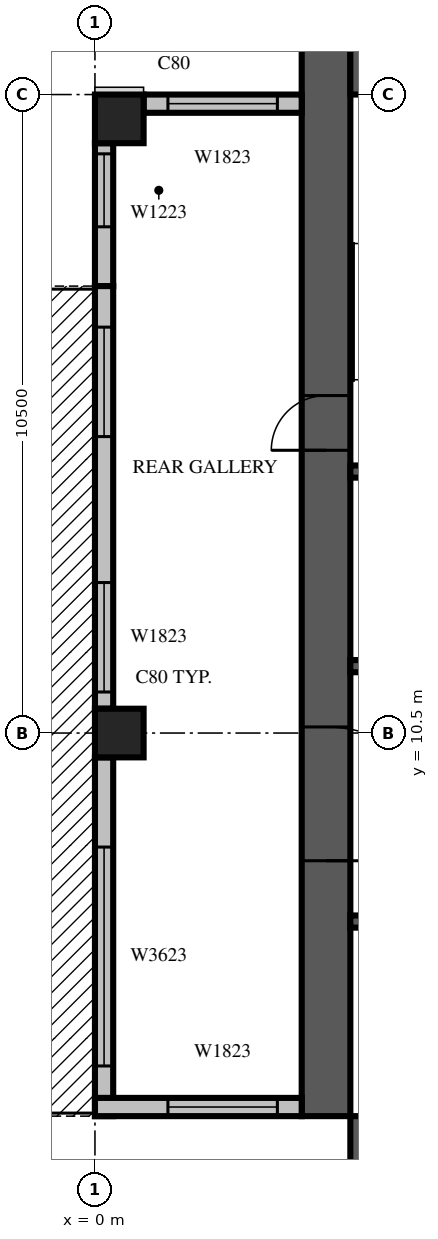
"""IFC4 building model, lengths in metres.
Left out: names, types, materials, properties, quantities, classifications, styles, units other than length and angle.
Written with IfcOpenShell. Run it as: python <this file> out.ifc"""

import sys

from ifc_helpers import new_model, si_unit, direction, frame, frame_2d, origin, origin_2d, place, context, subcontext, project, spatial, rectangle, extrude, source, transform, mapped, element, fill, save


model = new_model("IFC4")
c1 = context("Model", 3, precision=1e-05, world=origin(), true_north=direction((0.0, 1.0)))
c2 = subcontext(c1, "Body", "Model", "MODEL_VIEW")
j1 = project(units=[si_unit("LENGTHUNIT", "METRE"), si_unit("PLANEANGLEUNIT", "RADIAN")], contexts=[c1])
p1 = place(None, origin())
s1 = spatial("IfcSite", under=j1, at=p1, CompositionType="ELEMENT")
p2 = place(p1, origin())
s2 = spatial("IfcBuilding", under=s1, at=p2, CompositionType="ELEMENT")
p3 = place(p2, frame((0.0, 0.0, 238.6)))
s3 = spatial("IfcBuildingStorey", under=s2, at=p3, CompositionType="ELEMENT", Elevation=238.6)
m1 = source(origin(), c2, "Body", "SweptSolid", [
    extrude(rectangle(XDim=0.8, YDim=0.8, at=origin_2d()), origin(), (0.0, 0.0, 1.0), 3.8),
])
for number, where, z_axis, x_axis in (
    (1, (0.4, 10.5, 0.0), (0.0, 0.0, 1.0), (1.0, 0.0, 0.0)),
    (2, (0.4, 20.6, 0.0), (0.0, 0.0, 1.0), (1.0, 0.0, 0.0)),
):
    element("IfcColumn", number, at=place(p3, frame(where, z_axis=z_axis, x_axis=x_axis)), inside=s3, PredefinedType="COLUMN", context=c2, shape_type="MappedRepresentation", body=[
        mapped(m1, transform((0.0, 0.0, 0.0), scale=1.0)),
    ])
m2 = source(origin(), c2, "Body", "SweptSolid", [
    extrude(rectangle(XDim=17.6, YDim=0.8, at=frame_2d((8.8, 0.0))), origin(), (0.0, 0.0, 1.0), 3.8),
])
p4 = place(p3, frame((3.8, 4.2, 0.0), z_axis=(0.0, 0.0, 1.0), x_axis=(0.0, 1.0, 0.0)))
e3 = element("IfcWall", 3, at=p4, inside=s3, PredefinedType="SHEAR", context=c2, shape_type="MappedRepresentation", body=[
    mapped(m2, transform((0.0, 0.0, 0.0), scale=1.0)),
])
m3 = source(origin(), c2, "Body", "SweptSolid", [
    extrude(rectangle(XDim=2.2, YDim=2.1, at=frame_2d((1.1, 1.05))), frame((0.0, 0.41, 0.0), z_axis=(0.0, -1.0, 0.0), x_axis=(1.0, 0.0, 0.0)), (0.0, 0.0, 1.0), 0.82),
])
p5 = place(p4, frame((4.2, 0.0, 0.0)))
e4 = element("IfcOpeningElement", 4, at=p5, cuts=e3, PredefinedType="OPENING", context=c2, shape_type="MappedRepresentation", body=[
    mapped(m3, transform((0.0, 0.0, 0.0), scale=1.0)),
])
m4 = source(origin(), c2, "Body", "SweptSolid", [
    extrude(rectangle(XDim=0.9, YDim=2.1, at=frame_2d((0.45, 1.05))), frame((0.0, 0.41, 0.0), z_axis=(0.0, -1.0, 0.0), x_axis=(1.0, 0.0, 0.0)), (0.0, 0.0, 1.0), 0.82),
])
p6 = place(p4, frame((10.95, 0.0, 0.0)))
e5 = element("IfcOpeningElement", 5, at=p6, cuts=e3, PredefinedType="OPENING", context=c2, shape_type="MappedRepresentation", body=[
    mapped(m4, transform((0.0, 0.0, 0.0), scale=1.0)),
])
p7 = place(p3, frame((4.2, 3.8, 0.0), z_axis=(0.0, 0.0, 1.0), x_axis=(1.0, 0.0, 0.0)))
e6 = element("IfcWall", 6, at=p7, inside=s3, PredefinedType="SHEAR", context=c2, shape_type="MappedRepresentation", body=[
    mapped(m2, transform((0.0, 0.0, 0.0), scale=1.0)),
])
p8 = place(p7, frame((12.75, 0.0, 0.0)))
e7 = element("IfcOpeningElement", 7, at=p8, cuts=e6, PredefinedType="OPENING", context=c2, shape_type="MappedRepresentation", body=[
    mapped(m4, transform((0.0, 0.0, 0.0), scale=1.0)),
])
m5 = source(origin(), c2, "Body", "SweptSolid", [
    extrude(rectangle(XDim=16.8, YDim=0.8, at=frame_2d((8.4, 0.0))), origin(), (0.0, 0.0, 1.0), 3.8),
])
p9 = place(p3, frame((4.2, 21.4, 0.0), z_axis=(0.0, 0.0, 1.0), x_axis=(1.0, 0.0, 0.0)))
e8 = element("IfcWall", 8, at=p9, inside=s3, PredefinedType="SHEAR", context=c2, shape_type="MappedRepresentation", body=[
    mapped(m5, transform((0.0, 0.0, 0.0), scale=1.0)),
])
m6 = source(origin(), c2, "Body", "SweptSolid", [
    extrude(rectangle(XDim=1.2, YDim=2.1, at=frame_2d((0.6, 1.05))), frame((0.0, 0.41, 0.0), z_axis=(0.0, -1.0, 0.0), x_axis=(1.0, 0.0, 0.0)), (0.0, 0.0, 1.0), 0.82),
])
p10 = place(p9, frame((7.4, 0.0, 0.0)))
e9 = element("IfcOpeningElement", 9, at=p10, cuts=e8, PredefinedType="OPENING", context=c2, shape_type="MappedRepresentation", body=[
    mapped(m6, transform((0.0, 0.0, 0.0), scale=1.0)),
])
m7 = source(origin(), c2, "Body", "SweptSolid", [
    extrude(rectangle(XDim=2.6, YDim=0.3, at=frame_2d((1.3, 0.0))), origin(), (0.0, 0.0, 1.0), 3.4),
])
p11 = place(p3, frame((3.4, 20.85, 0.0), z_axis=(0.0, 0.0, 1.0), x_axis=(-1.0, 0.0, 0.0)))
e10 = element("IfcWall", 10, at=p11, inside=s3, PredefinedType="STANDARD", context=c2, shape_type="MappedRepresentation", body=[
    mapped(m7, transform((0.0, 0.0, 0.0), scale=1.0)),
])
m8 = source(origin(), c2, "Body", "SweptSolid", [
    extrude(rectangle(XDim=1.8, YDim=2.3, at=frame_2d((0.9, 1.15))), frame((0.0, 0.16, 0.0), z_axis=(0.0, -1.0, 0.0), x_axis=(1.0, 0.0, 0.0)), (0.0, 0.0, 1.0), 0.32),
])
p12 = place(p11, frame((0.4, 0.0, 0.6)))
e11 = element("IfcOpeningElement", 11, at=p12, cuts=e10, PredefinedType="OPENING", context=c2, shape_type="MappedRepresentation", body=[
    mapped(m8, transform((0.0, 0.0, 0.0), scale=1.0)),
])
m9 = source(origin(), c2, "Body", "SweptSolid", [
    extrude(rectangle(XDim=2.35, YDim=0.3, at=frame_2d((1.175, 0.0))), origin(), (0.0, 0.0, 1.0), 3.4),
])
p13 = place(p3, frame((0.15, 20.2, 0.0), z_axis=(0.0, 0.0, 1.0), x_axis=(0.0, -1.0, 0.0)))
e12 = element("IfcWall", 12, at=p13, inside=s3, PredefinedType="STANDARD", context=c2, shape_type="MappedRepresentation", body=[
    mapped(m9, transform((0.0, 0.0, 0.0), scale=1.0)),
])
m10 = source(origin(), c2, "Body", "SweptSolid", [
    extrude(rectangle(XDim=1.2, YDim=2.3, at=frame_2d((0.6, 1.15))), frame((0.0, 0.16, 0.0), z_axis=(0.0, -1.0, 0.0), x_axis=(1.0, 0.0, 0.0)), (0.0, 0.0, 1.0), 0.32),
])
p14 = place(p13, frame((0.175, 0.0, 0.6)))
e13 = element("IfcOpeningElement", 13, at=p14, cuts=e12, PredefinedType="OPENING", context=c2, shape_type="MappedRepresentation", body=[
    mapped(m10, transform((0.0, 0.0, 0.0), scale=1.0)),
])
m11 = source(origin(), c2, "Body", "SweptSolid", [
    extrude(rectangle(XDim=6.95, YDim=0.3, at=frame_2d((3.475, 0.0))), origin(), (0.0, 0.0, 1.0), 3.4),
])
p15 = place(p3, frame((0.15, 17.85, 0.0), z_axis=(0.0, 0.0, 1.0), x_axis=(0.0, -1.0, 0.0)))
e14 = element("IfcWall", 14, at=p15, inside=s3, PredefinedType="STANDARD", context=c2, shape_type="MappedRepresentation", body=[
    mapped(m11, transform((0.0, 0.0, 0.0), scale=1.0)),
])
m12 = source(origin(), c2, "Body", "SweptSolid", [
    extrude(rectangle(XDim=1.8, YDim=2.4, at=frame_2d((0.9, 1.2))), frame((0.0, 0.16, 0.0), z_axis=(0.0, -1.0, 0.0), x_axis=(1.0, 0.0, 0.0)), (0.0, 0.0, 1.0), 0.32),
])
p16 = place(p15, frame((0.675, 0.0, 0.0)))
e15 = element("IfcOpeningElement", 15, at=p16, cuts=e14, PredefinedType="OPENING", context=c2, shape_type="MappedRepresentation", body=[
    mapped(m12, transform((0.0, 0.0, 0.0), scale=1.0)),
])
p17 = place(p15, frame((4.875, 0.0, 0.6)))
e16 = element("IfcOpeningElement", 16, at=p17, cuts=e14, PredefinedType="OPENING", context=c2, shape_type="MappedRepresentation", body=[
    mapped(m8, transform((0.0, 0.0, 0.0), scale=1.0)),
])
m13 = source(origin(), c2, "Body", "SweptSolid", [
    extrude(rectangle(XDim=5.9, YDim=0.3, at=frame_2d((2.95, 0.0))), origin(), (0.0, 0.0, 1.0), 3.4),
])
p18 = place(p3, frame((0.15, 10.1, 0.0), z_axis=(0.0, 0.0, 1.0), x_axis=(0.0, -1.0, 0.0)))
e17 = element("IfcWall", 17, at=p18, inside=s3, PredefinedType="STANDARD", context=c2, shape_type="MappedRepresentation", body=[
    mapped(m13, transform((0.0, 0.0, 0.0), scale=1.0)),
])
m14 = source(origin(), c2, "Body", "SweptSolid", [
    extrude(rectangle(XDim=3.6, YDim=2.3, at=frame_2d((1.8, 1.15))), frame((0.0, 0.16, 0.0), z_axis=(0.0, -1.0, 0.0), x_axis=(1.0, 0.0, 0.0)), (0.0, 0.0, 1.0), 0.32),
])
p19 = place(p18, frame((1.475, 0.0, 0.6)))
e18 = element("IfcOpeningElement", 18, at=p19, cuts=e17, PredefinedType="OPENING", context=c2, shape_type="MappedRepresentation", body=[
    mapped(m14, transform((0.0, 0.0, 0.0), scale=1.0)),
])
m15 = source(origin(), c2, "Body", "SweptSolid", [
    extrude(rectangle(XDim=3.4, YDim=0.3, at=frame_2d((1.7, 0.0))), origin(), (0.0, 0.0, 1.0), 3.4),
])
p20 = place(p3, frame((0.0, 4.35, 0.0), z_axis=(0.0, 0.0, 1.0), x_axis=(1.0, 0.0, 0.0)))
e19 = element("IfcWall", 19, at=p20, inside=s3, PredefinedType="STANDARD", context=c2, shape_type="MappedRepresentation", body=[
    mapped(m15, transform((0.0, 0.0, 0.0), scale=1.0)),
])
p21 = place(p20, frame((1.2, 0.0, 0.6)))
e20 = element("IfcOpeningElement", 20, at=p21, cuts=e19, PredefinedType="OPENING", context=c2, shape_type="MappedRepresentation", body=[
    mapped(m8, transform((0.0, 0.0, 0.0), scale=1.0)),
])
m16 = source(origin(), c2, "Body", "SweptSolid", [
    extrude(rectangle(XDim=9.6, YDim=0.2, at=frame_2d((4.8, 0.0))), origin(), (0.0, 0.0, 1.0), 3.8),
])
p22 = place(p3, frame((4.2, 7.4, 0.0), z_axis=(0.0, 0.0, 1.0), x_axis=(1.0, 0.0, 0.0)))
e21 = element("IfcWall", 21, at=p22, inside=s3, PredefinedType="SOLIDWALL", context=c2, shape_type="MappedRepresentation", body=[
    mapped(m16, transform((0.0, 0.0, 0.0), scale=1.0)),
])
m17 = source(origin(), c2, "Body", "SweptSolid", [
    extrude(rectangle(XDim=1.1, YDim=2.1, at=frame_2d((0.55, 1.05))), frame((0.0, 0.11, 0.0), z_axis=(0.0, -1.0, 0.0), x_axis=(1.0, 0.0, 0.0)), (0.0, 0.0, 1.0), 0.22),
])
p23 = place(p22, frame((0.65, 0.0, 0.0)))
e22 = element("IfcOpeningElement", 22, at=p23, cuts=e21, PredefinedType="OPENING", context=c2, shape_type="MappedRepresentation", body=[
    mapped(m17, transform((0.0, 0.0, 0.0), scale=1.0)),
])
p24 = place(p22, frame((3.05, 0.0, 0.0)))
e23 = element("IfcOpeningElement", 23, at=p24, cuts=e21, PredefinedType="OPENING", context=c2, shape_type="MappedRepresentation", body=[
    mapped(m17, transform((0.0, 0.0, 0.0), scale=1.0)),
])
p25 = place(p22, frame((5.45, 0.0, 0.0)))
e24 = element("IfcOpeningElement", 24, at=p25, cuts=e21, PredefinedType="OPENING", context=c2, shape_type="MappedRepresentation", body=[
    mapped(m17, transform((0.0, 0.0, 0.0), scale=1.0)),
])
p26 = place(p22, frame((7.85, 0.0, 0.0)))
e25 = element("IfcOpeningElement", 25, at=p26, cuts=e21, PredefinedType="OPENING", context=c2, shape_type="MappedRepresentation", body=[
    mapped(m17, transform((0.0, 0.0, 0.0), scale=1.0)),
])
m18 = source(origin(), c2, "Body", "SweptSolid", [
    extrude(rectangle(XDim=4.8, YDim=0.2, at=frame_2d((2.4, 0.0))), origin(), (0.0, 0.0, 1.0), 3.8),
])
p27 = place(p3, frame((4.2, 11.6, 0.0), z_axis=(0.0, 0.0, 1.0), x_axis=(1.0, 0.0, 0.0)))
e26 = element("IfcWall", 26, at=p27, inside=s3, PredefinedType="SOLIDWALL", context=c2, shape_type="MappedRepresentation", body=[
    mapped(m18, transform((0.0, 0.0, 0.0), scale=1.0)),
])
p28 = place(p27, frame((0.65, 0.0, 0.0)))
e27 = element("IfcOpeningElement", 27, at=p28, cuts=e26, PredefinedType="OPENING", context=c2, shape_type="MappedRepresentation", body=[
    mapped(m17, transform((0.0, 0.0, 0.0), scale=1.0)),
])
p29 = place(p27, frame((3.05, 0.0, 0.0)))
e28 = element("IfcOpeningElement", 28, at=p29, cuts=e26, PredefinedType="OPENING", context=c2, shape_type="MappedRepresentation", body=[
    mapped(m17, transform((0.0, 0.0, 0.0), scale=1.0)),
])
p30 = place(p3, frame((4.2, 14.8, 0.0), z_axis=(0.0, 0.0, 1.0), x_axis=(1.0, 0.0, 0.0)))
e29 = element("IfcWall", 29, at=p30, inside=s3, PredefinedType="SOLIDWALL", context=c2, shape_type="MappedRepresentation", body=[
    mapped(m18, transform((0.0, 0.0, 0.0), scale=1.0)),
])
m19 = source(origin(), c2, "Body", "SweptSolid", [
    extrude(rectangle(XDim=1.8, YDim=2.3, at=frame_2d((0.9, 1.15))), frame((0.0, 0.03, 0.0), z_axis=(0.0, -1.0, 0.0), x_axis=(1.0, 0.0, 0.0)), (0.0, 0.0, 1.0), 0.06),
])
p31 = place(p12, origin())
e30 = element("IfcWindow", 30, at=p31, inside=s3, PartitioningType="SINGLE_PANEL", PredefinedType="WINDOW", context=c2, shape_type="MappedRepresentation", body=[
    mapped(m19, transform((0.0, 0.0, 0.0), scale=1.0)),
])
fill(e11, e30)
m20 = source(origin(), c2, "Body", "SweptSolid", [
    extrude(rectangle(XDim=1.2, YDim=2.3, at=frame_2d((0.6, 1.15))), frame((0.0, 0.03, 0.0), z_axis=(0.0, -1.0, 0.0), x_axis=(1.0, 0.0, 0.0)), (0.0, 0.0, 1.0), 0.06),
])
p32 = place(p14, origin())
e31 = element("IfcWindow", 31, at=p32, inside=s3, PartitioningType="SINGLE_PANEL", PredefinedType="WINDOW", context=c2, shape_type="MappedRepresentation", body=[
    mapped(m20, transform((0.0, 0.0, 0.0), scale=1.0)),
])
fill(e13, e31)
m21 = source(origin(), c2, "Body", "SweptSolid", [
    extrude(rectangle(XDim=1.8, YDim=2.4, at=frame_2d((0.9, 1.2))), frame((0.0, 0.025, 0.0), z_axis=(0.0, -1.0, 0.0), x_axis=(1.0, 0.0, 0.0)), (0.0, 0.0, 1.0), 0.05),
])
p33 = place(p16, origin())
e32 = element("IfcDoor", 32, at=p33, inside=s3, OperationType="SLIDING_TO_LEFT", PredefinedType="DOOR", context=c2, shape_type="MappedRepresentation", body=[
    mapped(m21, transform((0.0, 0.0, 0.0), scale=1.0)),
])
fill(e15, e32)
p34 = place(p17, origin())
e33 = element("IfcWindow", 33, at=p34, inside=s3, PartitioningType="SINGLE_PANEL", PredefinedType="WINDOW", context=c2, shape_type="MappedRepresentation", body=[
    mapped(m19, transform((0.0, 0.0, 0.0), scale=1.0)),
])
fill(e16, e33)
m22 = source(origin(), c2, "Body", "SweptSolid", [
    extrude(rectangle(XDim=3.6, YDim=2.3, at=frame_2d((1.8, 1.15))), frame((0.0, 0.03, 0.0), z_axis=(0.0, -1.0, 0.0), x_axis=(1.0, 0.0, 0.0)), (0.0, 0.0, 1.0), 0.06),
])
p35 = place(p19, origin())
e34 = element("IfcWindow", 34, at=p35, inside=s3, PartitioningType="SINGLE_PANEL", PredefinedType="WINDOW", context=c2, shape_type="MappedRepresentation", body=[
    mapped(m22, transform((0.0, 0.0, 0.0), scale=1.0)),
])
fill(e18, e34)
p36 = place(p21, origin())
e35 = element("IfcWindow", 35, at=p36, inside=s3, PartitioningType="SINGLE_PANEL", PredefinedType="WINDOW", context=c2, shape_type="MappedRepresentation", body=[
    mapped(m19, transform((0.0, 0.0, 0.0), scale=1.0)),
])
fill(e20, e35)
m23 = source(origin(), c2, "Body", "SweptSolid", [
    extrude(rectangle(XDim=2.2, YDim=2.1, at=frame_2d((1.1, 1.05))), frame((0.0, 0.025, 0.0), z_axis=(0.0, -1.0, 0.0), x_axis=(1.0, 0.0, 0.0)), (0.0, 0.0, 1.0), 0.05),
])
p37 = place(p5, origin())
e36 = element("IfcDoor", 36, at=p37, inside=s3, OperationType="DOUBLE_DOOR_SINGLE_SWING", PredefinedType="DOOR", context=c2, shape_type="MappedRepresentation", body=[
    mapped(m23, transform((0.0, 0.0, 0.0), scale=1.0)),
])
fill(e4, e36)
m24 = source(origin(), c2, "Body", "SweptSolid", [
    extrude(rectangle(XDim=0.9, YDim=2.1, at=frame_2d((0.45, 1.05))), frame((0.0, 0.025, 0.0), z_axis=(0.0, -1.0, 0.0), x_axis=(1.0, 0.0, 0.0)), (0.0, 0.0, 1.0), 0.05),
])
p38 = place(p6, origin())
e37 = element("IfcDoor", 37, at=p38, inside=s3, OperationType="SINGLE_SWING_LEFT", PredefinedType="DOOR", context=c2, shape_type="MappedRepresentation", body=[
    mapped(m24, transform((0.0, 0.0, 0.0), scale=1.0)),
])
fill(e5, e37)
save(model, sys.argv[1])
